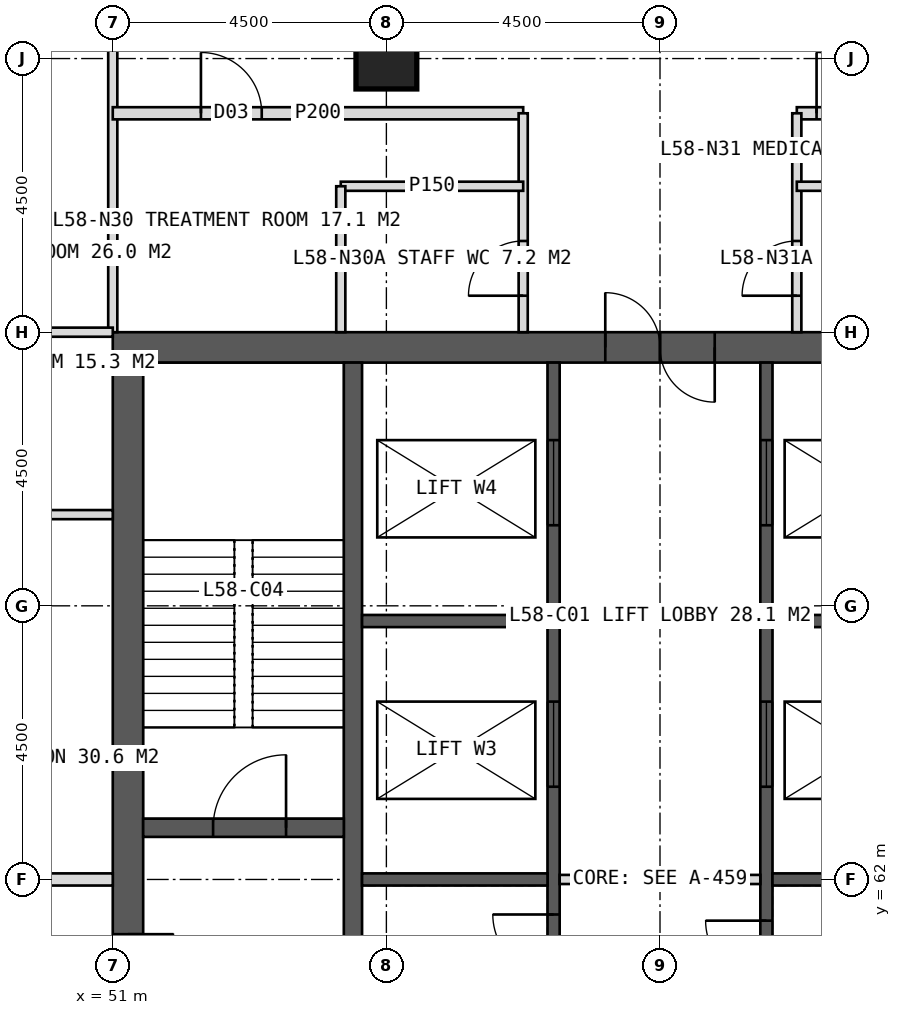
"""IFC4 building model, lengths in metres.
Left out: names, types, materials, properties, quantities, classifications, styles, units other than length and angle.
Written with IfcOpenShell. Run it as: python <this file> out.ifc"""

import sys

from ifc_helpers import new_model, si_unit, direction, frame, frame_2d, origin, origin_2d, place, context, subcontext, project, spatial, rectangle, hollow_rectangle, extrude, element, fill, save


model = new_model("IFC4")
c1 = context("Model", 3, precision=1e-05, world=origin(), true_north=direction((0.0, 1.0)))
c2 = subcontext(c1, "Body", "Model", "MODEL_VIEW")
j1 = project(units=[si_unit("LENGTHUNIT", "METRE"), si_unit("PLANEANGLEUNIT", "RADIAN")], contexts=[c1])
p1 = place(None, origin())
s1 = spatial("IfcSite", under=j1, at=p1, CompositionType="ELEMENT")
p2 = place(p1, origin())
s2 = spatial("IfcBuilding", under=s1, at=p2, CompositionType="ELEMENT")
p3 = place(p2, frame((0.0, 0.0, 241.0)))
s3 = spatial("IfcBuildingStorey", under=s2, at=p3, CompositionType="ELEMENT", Elevation=241.0)
p4 = place(p3, frame((51.0, 70.75, 0.0), z_axis=(0.0, 0.0, 1.0), x_axis=(1.0, 0.0, 0.0)))
e1 = element("IfcWall", 1, at=p4, inside=s3, PredefinedType="SHEAR", context=c2, shape_type="SweptSolid", body=[
    extrude(rectangle(XDim=18.0, YDim=0.5, at=frame_2d((9.0, 0.0))), origin(), (0.0, 0.0, 1.0), 4.0),
])
p5 = place(p4, frame((8.1, 0.0, 0.0)))
e2 = element("IfcOpeningElement", 2, at=p5, cuts=e1, PredefinedType="OPENING", context=c2, shape_type="SweptSolid", body=[
    extrude(rectangle(XDim=1.8, YDim=2.2, at=frame_2d((0.9, 1.1))), frame((0.0, 0.26, 0.0), z_axis=(0.0, -1.0, 0.0), x_axis=(1.0, 0.0, 0.0)), (0.0, 0.0, 1.0), 0.52),
])
p6 = place(p3, frame((51.25, 53.5, 0.0), z_axis=(0.0, 0.0, 1.0), x_axis=(0.0, 1.0, 0.0)))
e3 = element("IfcWall", 3, at=p6, inside=s3, PredefinedType="SHEAR", context=c2, shape_type="SweptSolid", body=[
    extrude(rectangle(XDim=17.0, YDim=0.5, at=frame_2d((8.5, 0.0))), origin(), (0.0, 0.0, 1.0), 4.0),
])
p7 = place(p6, frame((6.1, 0.0, 0.0)))
e4 = element("IfcOpeningElement", 4, at=p7, cuts=e3, PredefinedType="OPENING", context=c2, shape_type="SweptSolid", body=[
    extrude(rectangle(XDim=1.5, YDim=2.2, at=frame_2d((0.75, 1.1))), frame((0.0, 0.26, 0.0), z_axis=(0.0, -1.0, 0.0), x_axis=(1.0, 0.0, 0.0)), (0.0, 0.0, 1.0), 0.52),
])
p8 = place(p3, frame((54.95, 53.5, 0.0), z_axis=(0.0, 0.0, 1.0), x_axis=(0.0, 1.0, 0.0)))
e5 = element("IfcWall", 5, at=p8, inside=s3, PredefinedType="SHEAR", context=c2, shape_type="SweptSolid", body=[
    extrude(rectangle(XDim=17.0, YDim=0.3, at=frame_2d((8.5, 0.0))), origin(), (0.0, 0.0, 1.0), 4.0),
])
p9 = place(p3, frame((58.25, 53.5, 0.0), z_axis=(0.0, 0.0, 1.0), x_axis=(0.0, 1.0, 0.0)))
e6 = element("IfcWall", 6, at=p9, inside=s3, PredefinedType="SHEAR", context=c2, shape_type="SweptSolid", body=[
    extrude(rectangle(XDim=17.0, YDim=0.2, at=frame_2d((8.5, 0.0))), origin(), (0.0, 0.0, 1.0), 4.0),
])
p10 = place(p9, frame((0.6, 0.0, 0.0)))
e7 = element("IfcOpeningElement", 7, at=p10, cuts=e6, PredefinedType="OPENING", context=c2, shape_type="SweptSolid", body=[
    extrude(rectangle(XDim=1.0, YDim=2.1, at=frame_2d((0.5, 1.05))), frame((0.0, 0.11, 0.0), z_axis=(0.0, -1.0, 0.0), x_axis=(1.0, 0.0, 0.0)), (0.0, 0.0, 1.0), 0.22),
])
p11 = place(p9, frame((2.75, 0.0, 0.0)))
e8 = element("IfcOpeningElement", 8, at=p11, cuts=e6, PredefinedType="OPENING", context=c2, shape_type="SweptSolid", body=[
    extrude(rectangle(XDim=1.0, YDim=2.1, at=frame_2d((0.5, 1.05))), frame((0.0, 0.11, 0.0), z_axis=(0.0, -1.0, 0.0), x_axis=(1.0, 0.0, 0.0)), (0.0, 0.0, 1.0), 0.22),
])
p12 = place(p9, frame((4.824, 0.0, 0.0)))
e9 = element("IfcOpeningElement", 9, at=p12, cuts=e6, PredefinedType="OPENING", context=c2, shape_type="SweptSolid", body=[
    extrude(rectangle(XDim=1.0, YDim=2.1, at=frame_2d((0.5, 1.05))), frame((0.0, 0.11, 0.0), z_axis=(0.0, -1.0, 0.0), x_axis=(1.0, 0.0, 0.0)), (0.0, 0.0, 1.0), 0.22),
])
p13 = place(p9, frame((6.924, 0.0, 0.0)))
e10 = element("IfcOpeningElement", 10, at=p13, cuts=e6, PredefinedType="OPENING", context=c2, shape_type="SweptSolid", body=[
    extrude(rectangle(XDim=1.0, YDim=2.1, at=frame_2d((0.5, 1.05))), frame((0.0, 0.11, 0.0), z_axis=(0.0, -1.0, 0.0), x_axis=(1.0, 0.0, 0.0)), (0.0, 0.0, 1.0), 0.22),
])
p14 = place(p9, frame((10.025, 0.0, 0.0)))
e11 = element("IfcOpeningElement", 11, at=p14, cuts=e6, PredefinedType="OPENING", context=c2, shape_type="SweptSolid", body=[
    extrude(rectangle(XDim=1.4, YDim=2.2, at=frame_2d((0.7, 1.1))), frame((0.0, 0.11, 0.0), z_axis=(0.0, -1.0, 0.0), x_axis=(1.0, 0.0, 0.0)), (0.0, 0.0, 1.0), 0.22),
])
p15 = place(p9, frame((14.325, 0.0, 0.0)))
e12 = element("IfcOpeningElement", 12, at=p15, cuts=e6, PredefinedType="OPENING", context=c2, shape_type="SweptSolid", body=[
    extrude(rectangle(XDim=1.4, YDim=2.2, at=frame_2d((0.7, 1.1))), frame((0.0, 0.11, 0.0), z_axis=(0.0, -1.0, 0.0), x_axis=(1.0, 0.0, 0.0)), (0.0, 0.0, 1.0), 0.22),
])
p16 = place(p3, frame((61.75, 53.5, 0.0), z_axis=(0.0, 0.0, 1.0), x_axis=(0.0, 1.0, 0.0)))
e13 = element("IfcWall", 13, at=p16, inside=s3, PredefinedType="SHEAR", context=c2, shape_type="SweptSolid", body=[
    extrude(rectangle(XDim=17.0, YDim=0.2, at=frame_2d((8.5, 0.0))), origin(), (0.0, 0.0, 1.0), 4.0),
])
p17 = place(p16, frame((0.808, 0.0, 0.0)))
e14 = element("IfcOpeningElement", 14, at=p17, cuts=e13, PredefinedType="OPENING", context=c2, shape_type="SweptSolid", body=[
    extrude(rectangle(XDim=1.0, YDim=2.1, at=frame_2d((0.5, 1.05))), frame((0.0, 0.11, 0.0), z_axis=(0.0, -1.0, 0.0), x_axis=(1.0, 0.0, 0.0)), (0.0, 0.0, 1.0), 0.22),
])
p18 = place(p16, frame((2.958, 0.0, 0.0)))
e15 = element("IfcOpeningElement", 15, at=p18, cuts=e13, PredefinedType="OPENING", context=c2, shape_type="SweptSolid", body=[
    extrude(rectangle(XDim=1.0, YDim=2.1, at=frame_2d((0.5, 1.05))), frame((0.0, 0.11, 0.0), z_axis=(0.0, -1.0, 0.0), x_axis=(1.0, 0.0, 0.0)), (0.0, 0.0, 1.0), 0.22),
])
p19 = place(p16, frame((4.722, 0.0, 0.0)))
e16 = element("IfcOpeningElement", 16, at=p19, cuts=e13, PredefinedType="OPENING", context=c2, shape_type="SweptSolid", body=[
    extrude(rectangle(XDim=1.0, YDim=2.1, at=frame_2d((0.5, 1.05))), frame((0.0, 0.11, 0.0), z_axis=(0.0, -1.0, 0.0), x_axis=(1.0, 0.0, 0.0)), (0.0, 0.0, 1.0), 0.22),
])
p20 = place(p16, frame((6.823, 0.0, 0.0)))
e17 = element("IfcOpeningElement", 17, at=p20, cuts=e13, PredefinedType="OPENING", context=c2, shape_type="SweptSolid", body=[
    extrude(rectangle(XDim=1.0, YDim=2.1, at=frame_2d((0.5, 1.05))), frame((0.0, 0.11, 0.0), z_axis=(0.0, -1.0, 0.0), x_axis=(1.0, 0.0, 0.0)), (0.0, 0.0, 1.0), 0.22),
])
p21 = place(p16, frame((10.025, 0.0, 0.0)))
e18 = element("IfcOpeningElement", 18, at=p21, cuts=e13, PredefinedType="OPENING", context=c2, shape_type="SweptSolid", body=[
    extrude(rectangle(XDim=1.4, YDim=2.2, at=frame_2d((0.7, 1.1))), frame((0.0, 0.11, 0.0), z_axis=(0.0, -1.0, 0.0), x_axis=(1.0, 0.0, 0.0)), (0.0, 0.0, 1.0), 0.22),
])
p22 = place(p16, frame((14.325, 0.0, 0.0)))
e19 = element("IfcOpeningElement", 19, at=p22, cuts=e13, PredefinedType="OPENING", context=c2, shape_type="SweptSolid", body=[
    extrude(rectangle(XDim=1.4, YDim=2.2, at=frame_2d((0.7, 1.1))), frame((0.0, 0.11, 0.0), z_axis=(0.0, -1.0, 0.0), x_axis=(1.0, 0.0, 0.0)), (0.0, 0.0, 1.0), 0.22),
])
for number, where, z_axis, x_axis in (
    (20, (55.1, 62.0, 0.0), (0.0, 0.0, 1.0), (1.0, 0.0, 0.0)),
    (21, (61.85, 62.0, 0.0), (0.0, 0.0, 1.0), (1.0, 0.0, 0.0)),
    (22, (55.1, 66.25, 0.0), (0.0, 0.0, 1.0), (1.0, 0.0, 0.0)),
    (23, (61.85, 66.25, 0.0), (0.0, 0.0, 1.0), (1.0, 0.0, 0.0)),
):
    element("IfcWall", number, at=place(p3, frame(where, z_axis=z_axis, x_axis=x_axis)), inside=s3, PredefinedType="SHEAR", context=c2, shape_type="SweptSolid", body=[
        extrude(rectangle(XDim=3.05, YDim=0.2, at=frame_2d((1.525, 0.0))), origin(), (0.0, 0.0, 1.0), 4.0),
    ])
p23 = place(p3, frame((51.5, 62.85, 0.0), z_axis=(0.0, 0.0, 1.0), x_axis=(1.0, 0.0, 0.0)))
e24 = element("IfcWall", 24, at=p23, inside=s3, PredefinedType="SHEAR", context=c2, shape_type="SweptSolid", body=[
    extrude(rectangle(XDim=3.3, YDim=0.3, at=frame_2d((1.65, 0.0))), origin(), (0.0, 0.0, 1.0), 4.0),
])
p24 = place(p23, frame((1.15, 0.0, 0.0)))
e25 = element("IfcOpeningElement", 25, at=p24, cuts=e24, PredefinedType="OPENING", context=c2, shape_type="SweptSolid", body=[
    extrude(rectangle(XDim=1.2, YDim=2.1, at=frame_2d((0.6, 1.05))), frame((0.0, 0.16, 0.0), z_axis=(0.0, -1.0, 0.0), x_axis=(1.0, 0.0, 0.0)), (0.0, 0.0, 1.0), 0.32),
])
p25 = place(p3, frame((55.5, 75.5, 0.0), z_axis=(0.0, 0.0, 1.0), x_axis=(1.0, 0.0, 0.0)))
e26 = element("IfcColumn", 26, at=p25, inside=s3, PredefinedType="COLUMN", context=c2, shape_type="SweptSolid", body=[
    extrude(hollow_rectangle(XDim=1.0, YDim=1.0, WallThickness=0.1, at=origin_2d()), origin(), (0.0, 0.0, 1.0), 4.0),
])
p26 = place(p3, frame((51.0, 71.0, 0.0), z_axis=(0.0, 0.0, 1.0), x_axis=(0.0, 1.0, 0.0)))
e27 = element("IfcWall", 27, at=p26, inside=s3, PredefinedType="PARTITIONING", context=c2, shape_type="SweptSolid", body=[
    extrude(rectangle(XDim=5.1, YDim=0.15, at=frame_2d((2.55, 0.0))), origin(), (0.0, 0.0, 1.0), 3.75),
])
p27 = place(p3, frame((51.0, 74.6, 0.0), z_axis=(0.0, 0.0, 1.0), x_axis=(1.0, 0.0, 0.0)))
e28 = element("IfcWall", 28, at=p27, inside=s3, PredefinedType="PARTITIONING", context=c2, shape_type="SweptSolid", body=[
    extrude(rectangle(XDim=6.75, YDim=0.2, at=frame_2d((3.375, 0.0))), origin(), (0.0, 0.0, 1.0), 3.75),
])
p28 = place(p27, frame((1.45, 0.0, 0.0)))
e29 = element("IfcOpeningElement", 29, at=p28, cuts=e28, PredefinedType="OPENING", context=c2, shape_type="SweptSolid", body=[
    extrude(rectangle(XDim=1.0, YDim=2.1, at=frame_2d((0.5, 1.05))), frame((0.0, 0.11, 0.0), z_axis=(0.0, -1.0, 0.0), x_axis=(1.0, 0.0, 0.0)), (0.0, 0.0, 1.0), 0.22),
])
p29 = place(p3, frame((62.25, 74.6, 0.0), z_axis=(0.0, 0.0, 1.0), x_axis=(1.0, 0.0, 0.0)))
e30 = element("IfcWall", 30, at=p29, inside=s3, PredefinedType="PARTITIONING", context=c2, shape_type="SweptSolid", body=[
    extrude(rectangle(XDim=6.75, YDim=0.2, at=frame_2d((3.375, 0.0))), origin(), (0.0, 0.0, 1.0), 3.75),
])
p30 = place(p29, frame((0.325, 0.0, 0.0)))
e31 = element("IfcOpeningElement", 31, at=p30, cuts=e30, PredefinedType="OPENING", context=c2, shape_type="SweptSolid", body=[
    extrude(rectangle(XDim=1.0, YDim=2.1, at=frame_2d((0.5, 1.05))), frame((0.0, 0.11, 0.0), z_axis=(0.0, -1.0, 0.0), x_axis=(1.0, 0.0, 0.0)), (0.0, 0.0, 1.0), 0.22),
])
p31 = place(p29, frame((4.75, 0.0, 0.0)))
e32 = element("IfcOpeningElement", 32, at=p31, cuts=e30, PredefinedType="OPENING", context=c2, shape_type="SweptSolid", body=[
    extrude(rectangle(XDim=1.0, YDim=2.1, at=frame_2d((0.5, 1.05))), frame((0.0, 0.11, 0.0), z_axis=(0.0, -1.0, 0.0), x_axis=(1.0, 0.0, 0.0)), (0.0, 0.0, 1.0), 0.22),
])
p32 = place(p3, frame((57.75, 71.0, 0.0), z_axis=(0.0, 0.0, 1.0), x_axis=(0.0, 1.0, 0.0)))
e33 = element("IfcWall", 33, at=p32, inside=s3, PredefinedType="PARTITIONING", context=c2, shape_type="SweptSolid", body=[
    extrude(rectangle(XDim=3.6, YDim=0.15, at=frame_2d((1.8, 0.0))), origin(), (0.0, 0.0, 1.0), 3.75),
])
p33 = place(p32, frame((0.6, 0.0, 0.0)))
e34 = element("IfcOpeningElement", 34, at=p33, cuts=e33, PredefinedType="OPENING", context=c2, shape_type="SweptSolid", body=[
    extrude(rectangle(XDim=0.9, YDim=2.1, at=frame_2d((0.45, 1.05))), frame((0.0, 0.085, 0.0), z_axis=(0.0, -1.0, 0.0), x_axis=(1.0, 0.0, 0.0)), (0.0, 0.0, 1.0), 0.17),
])
p34 = place(p3, frame((62.25, 71.0, 0.0), z_axis=(0.0, 0.0, 1.0), x_axis=(0.0, 1.0, 0.0)))
e35 = element("IfcWall", 35, at=p34, inside=s3, PredefinedType="PARTITIONING", context=c2, shape_type="SweptSolid", body=[
    extrude(rectangle(XDim=3.6, YDim=0.15, at=frame_2d((1.8, 0.0))), origin(), (0.0, 0.0, 1.0), 3.75),
])
p35 = place(p34, frame((0.6, 0.0, 0.0)))
e36 = element("IfcOpeningElement", 36, at=p35, cuts=e35, PredefinedType="OPENING", context=c2, shape_type="SweptSolid", body=[
    extrude(rectangle(XDim=0.9, YDim=2.1, at=frame_2d((0.45, 1.05))), frame((0.0, 0.085, 0.0), z_axis=(0.0, -1.0, 0.0), x_axis=(1.0, 0.0, 0.0)), (0.0, 0.0, 1.0), 0.17),
])
p36 = place(p3, frame((54.75, 73.4, 0.0), z_axis=(0.0, 0.0, 1.0), x_axis=(1.0, 0.0, 0.0)))
e37 = element("IfcWall", 37, at=p36, inside=s3, PredefinedType="PARTITIONING", context=c2, shape_type="SweptSolid", body=[
    extrude(rectangle(XDim=3.0, YDim=0.15, at=frame_2d((1.5, 0.0))), origin(), (0.0, 0.0, 1.0), 3.75),
])
p37 = place(p3, frame((54.75, 71.0, 0.0), z_axis=(0.0, 0.0, 1.0), x_axis=(0.0, 1.0, 0.0)))
e38 = element("IfcWall", 38, at=p37, inside=s3, PredefinedType="PARTITIONING", context=c2, shape_type="SweptSolid", body=[
    extrude(rectangle(XDim=2.4, YDim=0.15, at=frame_2d((1.2, 0.0))), origin(), (0.0, 0.0, 1.0), 3.75),
])
p38 = place(p3, frame((62.25, 73.4, 0.0), z_axis=(0.0, 0.0, 1.0), x_axis=(1.0, 0.0, 0.0)))
e39 = element("IfcWall", 39, at=p38, inside=s3, PredefinedType="PARTITIONING", context=c2, shape_type="SweptSolid", body=[
    extrude(rectangle(XDim=3.0, YDim=0.15, at=frame_2d((1.5, 0.0))), origin(), (0.0, 0.0, 1.0), 3.75),
])
p39 = place(p3, frame((51.0, 62.0, 0.0), z_axis=(0.0, 0.0, 1.0), x_axis=(-1.0, 0.0, 0.0)))
e40 = element("IfcWall", 40, at=p39, inside=s3, PredefinedType="SOLIDWALL", context=c2, shape_type="SweptSolid", body=[
    extrude(rectangle(XDim=5.1, YDim=0.2, at=frame_2d((2.55, 0.0))), origin(), (0.0, 0.0, 1.0), 2.95),
])
for number, where, z_axis, x_axis in (
    (41, (51.0, 68.0, 0.0), (0.0, 0.0, 1.0), (-1.0, 0.0, 0.0)),
    (42, (51.0, 71.0, 0.0), (0.0, 0.0, 1.0), (-1.0, 0.0, 0.0)),
):
    element("IfcWall", number, at=place(p3, frame(where, z_axis=z_axis, x_axis=x_axis)), inside=s3, PredefinedType="PARTITIONING", context=c2, shape_type="SweptSolid", body=[
        extrude(rectangle(XDim=5.1, YDim=0.15, at=frame_2d((2.55, 0.0))), origin(), (0.0, 0.0, 1.0), 3.75),
    ])
p40 = place(p3, frame((58.35, 62.0, 0.0), z_axis=(0.0, 0.0, 1.0), x_axis=(1.0, 0.0, 0.0)))
e43 = element("IfcWall", 43, at=p40, inside=s3, PredefinedType="PARTITIONING", context=c2, shape_type="SweptSolid", body=[
    extrude(rectangle(XDim=3.3, YDim=0.15, at=frame_2d((1.65, 0.0))), origin(), (0.0, 0.0, 1.0), 3.75),
])
p41 = place(p33, origin())
e44 = element("IfcDoor", 44, at=p41, inside=s3, OperationType="SINGLE_SWING_LEFT", PredefinedType="DOOR", context=c2, shape_type="SweptSolid", body=[
    extrude(rectangle(XDim=0.9, YDim=2.1, at=frame_2d((0.45, 1.05))), frame((0.0, 0.025, 0.0), z_axis=(0.0, -1.0, 0.0), x_axis=(1.0, 0.0, 0.0)), (0.0, 0.0, 1.0), 0.05),
])
fill(e34, e44)
p42 = place(p28, origin())
e45 = element("IfcDoor", 45, at=p42, inside=s3, OperationType="SINGLE_SWING_LEFT", PredefinedType="DOOR", context=c2, shape_type="SweptSolid", body=[
    extrude(rectangle(XDim=1.0, YDim=2.1, at=frame_2d((0.5, 1.05))), frame((0.0, 0.025, 0.0), z_axis=(0.0, -1.0, 0.0), x_axis=(1.0, 0.0, 0.0)), (0.0, 0.0, 1.0), 0.05),
])
fill(e29, e45)
p43 = place(p35, origin())
e46 = element("IfcDoor", 46, at=p43, inside=s3, OperationType="SINGLE_SWING_LEFT", PredefinedType="DOOR", context=c2, shape_type="SweptSolid", body=[
    extrude(rectangle(XDim=0.9, YDim=2.1, at=frame_2d((0.45, 1.05))), frame((0.0, 0.025, 0.0), z_axis=(0.0, -1.0, 0.0), x_axis=(1.0, 0.0, 0.0)), (0.0, 0.0, 1.0), 0.05),
])
fill(e36, e46)
p44 = place(p30, origin())
e47 = element("IfcDoor", 47, at=p44, inside=s3, OperationType="SINGLE_SWING_LEFT", PredefinedType="DOOR", context=c2, shape_type="SweptSolid", body=[
    extrude(rectangle(XDim=1.0, YDim=2.1, at=frame_2d((0.5, 1.05))), frame((0.0, 0.025, 0.0), z_axis=(0.0, -1.0, 0.0), x_axis=(1.0, 0.0, 0.0)), (0.0, 0.0, 1.0), 0.05),
])
fill(e31, e47)
p45 = place(p5, origin())
e48 = element("IfcDoor", 48, at=p45, inside=s3, OperationType="DOUBLE_DOOR_SINGLE_SWING", PredefinedType="DOOR", context=c2, shape_type="SweptSolid", body=[
    extrude(rectangle(XDim=1.8, YDim=2.2, at=frame_2d((0.9, 1.1))), frame((0.0, 0.025, 0.0), z_axis=(0.0, -1.0, 0.0), x_axis=(1.0, 0.0, 0.0)), (0.0, 0.0, 1.0), 0.05),
])
fill(e2, e48)
p46 = place(p7, origin())
e49 = element("IfcDoor", 49, at=p46, inside=s3, OperationType="DOUBLE_DOOR_SINGLE_SWING", PredefinedType="DOOR", context=c2, shape_type="SweptSolid", body=[
    extrude(rectangle(XDim=1.5, YDim=2.2, at=frame_2d((0.75, 1.1))), frame((0.0, 0.025, 0.0), z_axis=(0.0, -1.0, 0.0), x_axis=(1.0, 0.0, 0.0)), (0.0, 0.0, 1.0), 0.05),
])
fill(e4, e49)
p47 = place(p24, origin())
e50 = element("IfcDoor", 50, at=p47, inside=s3, OperationType="SINGLE_SWING_RIGHT", PredefinedType="DOOR", context=c2, shape_type="SweptSolid", body=[
    extrude(rectangle(XDim=1.2, YDim=2.1, at=frame_2d((0.6, 1.05))), frame((0.0, 0.025, 0.0), z_axis=(0.0, -1.0, 0.0), x_axis=(1.0, 0.0, 0.0)), (0.0, 0.0, 1.0), 0.05),
])
fill(e25, e50)
p48 = place(p13, origin())
e51 = element("IfcDoor", 51, at=p48, inside=s3, OperationType="SINGLE_SWING_RIGHT", PredefinedType="DOOR", context=c2, shape_type="SweptSolid", body=[
    extrude(rectangle(XDim=1.0, YDim=2.1, at=frame_2d((0.5, 1.05))), frame((0.0, 0.025, 0.0), z_axis=(0.0, -1.0, 0.0), x_axis=(1.0, 0.0, 0.0)), (0.0, 0.0, 1.0), 0.05),
])
fill(e10, e51)
p49 = place(p20, origin())
e52 = element("IfcDoor", 52, at=p49, inside=s3, OperationType="SINGLE_SWING_RIGHT", PredefinedType="DOOR", context=c2, shape_type="SweptSolid", body=[
    extrude(rectangle(XDim=1.0, YDim=2.1, at=frame_2d((0.5, 1.05))), frame((0.0, 0.025, 0.0), z_axis=(0.0, -1.0, 0.0), x_axis=(1.0, 0.0, 0.0)), (0.0, 0.0, 1.0), 0.05),
])
fill(e17, e52)
p50 = place(p14, origin())
e53 = element("IfcDoor", 53, at=p50, inside=s3, OperationType="SLIDING_TO_LEFT", PredefinedType="DOOR", context=c2, shape_type="SweptSolid", body=[
    extrude(rectangle(XDim=1.4, YDim=2.2, at=frame_2d((0.7, 1.1))), frame((0.0, 0.025, 0.0), z_axis=(0.0, -1.0, 0.0), x_axis=(1.0, 0.0, 0.0)), (0.0, 0.0, 1.0), 0.05),
])
fill(e11, e53)
p51 = place(p21, origin())
e54 = element("IfcDoor", 54, at=p51, inside=s3, OperationType="SLIDING_TO_LEFT", PredefinedType="DOOR", context=c2, shape_type="SweptSolid", body=[
    extrude(rectangle(XDim=1.4, YDim=2.2, at=frame_2d((0.7, 1.1))), frame((0.0, 0.025, 0.0), z_axis=(0.0, -1.0, 0.0), x_axis=(1.0, 0.0, 0.0)), (0.0, 0.0, 1.0), 0.05),
])
fill(e18, e54)
p52 = place(p15, origin())
e55 = element("IfcDoor", 55, at=p52, inside=s3, OperationType="SLIDING_TO_LEFT", PredefinedType="DOOR", context=c2, shape_type="SweptSolid", body=[
    extrude(rectangle(XDim=1.4, YDim=2.2, at=frame_2d((0.7, 1.1))), frame((0.0, 0.025, 0.0), z_axis=(0.0, -1.0, 0.0), x_axis=(1.0, 0.0, 0.0)), (0.0, 0.0, 1.0), 0.05),
])
fill(e12, e55)
p53 = place(p22, origin())
e56 = element("IfcDoor", 56, at=p53, inside=s3, OperationType="SLIDING_TO_LEFT", PredefinedType="DOOR", context=c2, shape_type="SweptSolid", body=[
    extrude(rectangle(XDim=1.4, YDim=2.2, at=frame_2d((0.7, 1.1))), frame((0.0, 0.025, 0.0), z_axis=(0.0, -1.0, 0.0), x_axis=(1.0, 0.0, 0.0)), (0.0, 0.0, 1.0), 0.05),
])
fill(e19, e56)
save(model, sys.argv[1])
